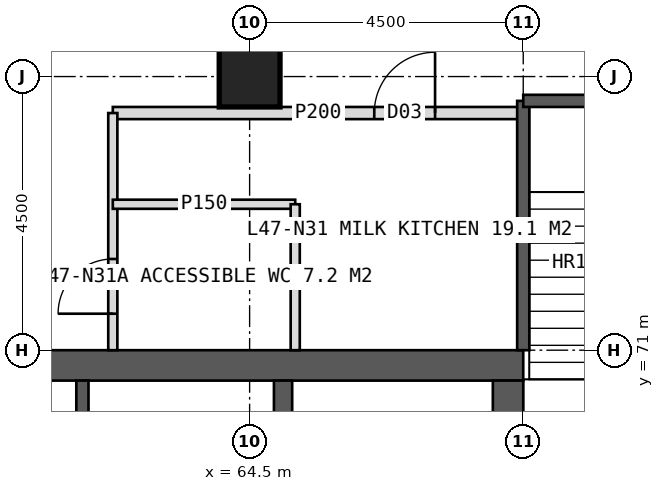
"""IFC4 building model, lengths in metres.
Left out: names, types, materials, properties, quantities, classifications, styles, units other than length and angle.
Written with IfcOpenShell. Run it as: python <this file> out.ifc"""

import sys

from ifc_helpers import new_model, si_unit, direction, frame, frame_2d, origin, origin_2d, place, context, subcontext, project, spatial, rectangle, hollow_rectangle, extrude, element, fill, save


model = new_model("IFC4")
c1 = context("Model", 3, precision=1e-05, world=origin(), true_north=direction((0.0, 1.0)))
c2 = subcontext(c1, "Body", "Model", "MODEL_VIEW")
j1 = project(units=[si_unit("LENGTHUNIT", "METRE"), si_unit("PLANEANGLEUNIT", "RADIAN")], contexts=[c1])
p1 = place(None, origin())
s1 = spatial("IfcSite", under=j1, at=p1, CompositionType="ELEMENT")
p2 = place(p1, origin())
s2 = spatial("IfcBuilding", under=s1, at=p2, CompositionType="ELEMENT")
p3 = place(p2, frame((0.0, 0.0, 197.0)))
s3 = spatial("IfcBuildingStorey", under=s2, at=p3, CompositionType="ELEMENT", Elevation=197.0)
p4 = place(p3, frame((51.0, 70.75, 0.0), z_axis=(0.0, 0.0, 1.0), x_axis=(1.0, 0.0, 0.0)))
e1 = element("IfcWall", 1, at=p4, inside=s3, PredefinedType="SHEAR", context=c2, shape_type="SweptSolid", body=[
    extrude(rectangle(XDim=18.0, YDim=0.5, at=frame_2d((9.0, 0.0))), origin(), (0.0, 0.0, 1.0), 4.0),
])
p5 = place(p4, frame((8.1, 0.0, 0.0)))
e2 = element("IfcOpeningElement", 2, at=p5, cuts=e1, PredefinedType="OPENING", context=c2, shape_type="SweptSolid", body=[
    extrude(rectangle(XDim=1.8, YDim=2.2, at=frame_2d((0.9, 1.1))), frame((0.0, 0.26, 0.0), z_axis=(0.0, -1.0, 0.0), x_axis=(1.0, 0.0, 0.0)), (0.0, 0.0, 1.0), 0.52),
])
p6 = place(p3, frame((68.75, 53.5, 0.0), z_axis=(0.0, 0.0, 1.0), x_axis=(0.0, 1.0, 0.0)))
e3 = element("IfcWall", 3, at=p6, inside=s3, PredefinedType="SHEAR", context=c2, shape_type="SweptSolid", body=[
    extrude(rectangle(XDim=17.0, YDim=0.5, at=frame_2d((8.5, 0.0))), origin(), (0.0, 0.0, 1.0), 4.0),
])
p7 = place(p6, frame((9.6, 0.0, 0.0)))
e4 = element("IfcOpeningElement", 4, at=p7, cuts=e3, PredefinedType="OPENING", context=c2, shape_type="SweptSolid", body=[
    extrude(rectangle(XDim=1.5, YDim=2.2, at=frame_2d((0.75, 1.1))), frame((0.0, 0.26, 0.0), z_axis=(0.0, -1.0, 0.0), x_axis=(1.0, 0.0, 0.0)), (0.0, 0.0, 1.0), 0.52),
])
p8 = place(p3, frame((65.05, 53.5, 0.0), z_axis=(0.0, 0.0, 1.0), x_axis=(0.0, 1.0, 0.0)))
e5 = element("IfcWall", 5, at=p8, inside=s3, PredefinedType="SHEAR", context=c2, shape_type="SweptSolid", body=[
    extrude(rectangle(XDim=17.0, YDim=0.3, at=frame_2d((8.5, 0.0))), origin(), (0.0, 0.0, 1.0), 4.0),
])
p9 = place(p3, frame((61.75, 53.5, 0.0), z_axis=(0.0, 0.0, 1.0), x_axis=(0.0, 1.0, 0.0)))
e6 = element("IfcWall", 6, at=p9, inside=s3, PredefinedType="SHEAR", context=c2, shape_type="SweptSolid", body=[
    extrude(rectangle(XDim=17.0, YDim=0.2, at=frame_2d((8.5, 0.0))), origin(), (0.0, 0.0, 1.0), 4.0),
])
p10 = place(p9, frame((0.393, 0.0, 0.0)))
e7 = element("IfcOpeningElement", 7, at=p10, cuts=e6, PredefinedType="OPENING", context=c2, shape_type="SweptSolid", body=[
    extrude(rectangle(XDim=1.0, YDim=2.1, at=frame_2d((0.5, 1.05))), frame((0.0, 0.11, 0.0), z_axis=(0.0, -1.0, 0.0), x_axis=(1.0, 0.0, 0.0)), (0.0, 0.0, 1.0), 0.22),
])
p11 = place(p9, frame((2.542, 0.0, 0.0)))
e8 = element("IfcOpeningElement", 8, at=p11, cuts=e6, PredefinedType="OPENING", context=c2, shape_type="SweptSolid", body=[
    extrude(rectangle(XDim=1.0, YDim=2.1, at=frame_2d((0.5, 1.05))), frame((0.0, 0.11, 0.0), z_axis=(0.0, -1.0, 0.0), x_axis=(1.0, 0.0, 0.0)), (0.0, 0.0, 1.0), 0.22),
])
p12 = place(p9, frame((5.127, 0.0, 0.0)))
e9 = element("IfcOpeningElement", 9, at=p12, cuts=e6, PredefinedType="OPENING", context=c2, shape_type="SweptSolid", body=[
    extrude(rectangle(XDim=1.0, YDim=2.1, at=frame_2d((0.5, 1.05))), frame((0.0, 0.11, 0.0), z_axis=(0.0, -1.0, 0.0), x_axis=(1.0, 0.0, 0.0)), (0.0, 0.0, 1.0), 0.22),
])
p13 = place(p9, frame((7.228, 0.0, 0.0)))
e10 = element("IfcOpeningElement", 10, at=p13, cuts=e6, PredefinedType="OPENING", context=c2, shape_type="SweptSolid", body=[
    extrude(rectangle(XDim=1.0, YDim=2.1, at=frame_2d((0.5, 1.05))), frame((0.0, 0.11, 0.0), z_axis=(0.0, -1.0, 0.0), x_axis=(1.0, 0.0, 0.0)), (0.0, 0.0, 1.0), 0.22),
])
p14 = place(p9, frame((10.025, 0.0, 0.0)))
e11 = element("IfcOpeningElement", 11, at=p14, cuts=e6, PredefinedType="OPENING", context=c2, shape_type="SweptSolid", body=[
    extrude(rectangle(XDim=1.4, YDim=2.2, at=frame_2d((0.7, 1.1))), frame((0.0, 0.11, 0.0), z_axis=(0.0, -1.0, 0.0), x_axis=(1.0, 0.0, 0.0)), (0.0, 0.0, 1.0), 0.22),
])
p15 = place(p9, frame((14.325, 0.0, 0.0)))
e12 = element("IfcOpeningElement", 12, at=p15, cuts=e6, PredefinedType="OPENING", context=c2, shape_type="SweptSolid", body=[
    extrude(rectangle(XDim=1.4, YDim=2.2, at=frame_2d((0.7, 1.1))), frame((0.0, 0.11, 0.0), z_axis=(0.0, -1.0, 0.0), x_axis=(1.0, 0.0, 0.0)), (0.0, 0.0, 1.0), 0.22),
])
p16 = place(p3, frame((64.5, 75.5, 0.0), z_axis=(0.0, 0.0, 1.0), x_axis=(1.0, 0.0, 0.0)))
e13 = element("IfcColumn", 13, at=p16, inside=s3, PredefinedType="COLUMN", context=c2, shape_type="SweptSolid", body=[
    extrude(hollow_rectangle(XDim=1.0, YDim=1.0, WallThickness=0.1, at=origin_2d()), origin(), (0.0, 0.0, 1.0), 4.0),
])
p17 = place(p3, frame((62.25, 74.9, 0.0), z_axis=(0.0, 0.0, 1.0), x_axis=(1.0, 0.0, 0.0)))
e14 = element("IfcWall", 14, at=p17, inside=s3, PredefinedType="PARTITIONING", context=c2, shape_type="SweptSolid", body=[
    extrude(rectangle(XDim=6.75, YDim=0.2, at=frame_2d((3.375, 0.0))), origin(), (0.0, 0.0, 1.0), 3.75),
])
p18 = place(p17, frame((4.3, 0.0, 0.0)))
e15 = element("IfcOpeningElement", 15, at=p18, cuts=e14, PredefinedType="OPENING", context=c2, shape_type="SweptSolid", body=[
    extrude(rectangle(XDim=1.0, YDim=2.1, at=frame_2d((0.5, 1.05))), frame((0.0, 0.11, 0.0), z_axis=(0.0, -1.0, 0.0), x_axis=(1.0, 0.0, 0.0)), (0.0, 0.0, 1.0), 0.22),
])
p19 = place(p3, frame((62.25, 71.0, 0.0), z_axis=(0.0, 0.0, 1.0), x_axis=(0.0, 1.0, 0.0)))
e16 = element("IfcWall", 16, at=p19, inside=s3, PredefinedType="PARTITIONING", context=c2, shape_type="SweptSolid", body=[
    extrude(rectangle(XDim=3.9, YDim=0.15, at=frame_2d((1.95, 0.0))), origin(), (0.0, 0.0, 1.0), 3.75),
])
p20 = place(p19, frame((0.6, 0.0, 0.0)))
e17 = element("IfcOpeningElement", 17, at=p20, cuts=e16, PredefinedType="OPENING", context=c2, shape_type="SweptSolid", body=[
    extrude(rectangle(XDim=0.9, YDim=2.1, at=frame_2d((0.45, 1.05))), frame((0.0, 0.085, 0.0), z_axis=(0.0, -1.0, 0.0), x_axis=(1.0, 0.0, 0.0)), (0.0, 0.0, 1.0), 0.17),
])
p21 = place(p3, frame((62.25, 73.4, 0.0), z_axis=(0.0, 0.0, 1.0), x_axis=(1.0, 0.0, 0.0)))
e18 = element("IfcWall", 18, at=p21, inside=s3, PredefinedType="PARTITIONING", context=c2, shape_type="SweptSolid", body=[
    extrude(rectangle(XDim=3.0, YDim=0.15, at=frame_2d((1.5, 0.0))), origin(), (0.0, 0.0, 1.0), 3.75),
])
p22 = place(p3, frame((65.25, 71.0, 0.0), z_axis=(0.0, 0.0, 1.0), x_axis=(0.0, 1.0, 0.0)))
e19 = element("IfcWall", 19, at=p22, inside=s3, PredefinedType="PARTITIONING", context=c2, shape_type="SweptSolid", body=[
    extrude(rectangle(XDim=2.4, YDim=0.15, at=frame_2d((1.2, 0.0))), origin(), (0.0, 0.0, 1.0), 3.75),
])
p23 = place(p3, frame((69.0, 71.0, 0.0), z_axis=(0.0, 0.0, 1.0), x_axis=(0.0, 1.0, 0.0)))
e20 = element("IfcWall", 20, at=p23, inside=s3, PredefinedType="SOLIDWALL", context=c2, shape_type="SweptSolid", body=[
    extrude(rectangle(XDim=4.1, YDim=0.2, at=frame_2d((2.05, 0.0))), origin(), (0.0, 0.0, 1.0), 3.75),
])
p24 = place(p3, frame((69.0, 75.1, 0.0), z_axis=(0.0, 0.0, 1.0), x_axis=(1.0, 0.0, 0.0)))
e21 = element("IfcWall", 21, at=p24, inside=s3, PredefinedType="SOLIDWALL", context=c2, shape_type="SweptSolid", body=[
    extrude(rectangle(XDim=3.5, YDim=0.2, at=frame_2d((1.75, 0.0))), origin(), (0.0, 0.0, 1.0), 3.75),
])
p25 = place(p24, frame((1.15, 0.0, 0.0)))
e22 = element("IfcOpeningElement", 22, at=p25, cuts=e21, PredefinedType="OPENING", context=c2, shape_type="SweptSolid", body=[
    extrude(rectangle(XDim=1.2, YDim=2.1, at=frame_2d((0.6, 1.05))), frame((0.0, 0.11, 0.0), z_axis=(0.0, -1.0, 0.0), x_axis=(1.0, 0.0, 0.0)), (0.0, 0.0, 1.0), 0.22),
])
p26 = place(p20, origin())
e23 = element("IfcDoor", 23, at=p26, inside=s3, OperationType="SINGLE_SWING_LEFT", PredefinedType="DOOR", context=c2, shape_type="SweptSolid", body=[
    extrude(rectangle(XDim=0.9, YDim=2.1, at=frame_2d((0.45, 1.05))), frame((0.0, 0.025, 0.0), z_axis=(0.0, -1.0, 0.0), x_axis=(1.0, 0.0, 0.0)), (0.0, 0.0, 1.0), 0.05),
])
fill(e17, e23)
p27 = place(p18, origin())
e24 = element("IfcDoor", 24, at=p27, inside=s3, OperationType="SINGLE_SWING_RIGHT", PredefinedType="DOOR", context=c2, shape_type="SweptSolid", body=[
    extrude(rectangle(XDim=1.0, YDim=2.1, at=frame_2d((0.5, 1.05))), frame((0.0, 0.025, 0.0), z_axis=(0.0, -1.0, 0.0), x_axis=(1.0, 0.0, 0.0)), (0.0, 0.0, 1.0), 0.05),
])
fill(e15, e24)
save(model, sys.argv[1])
